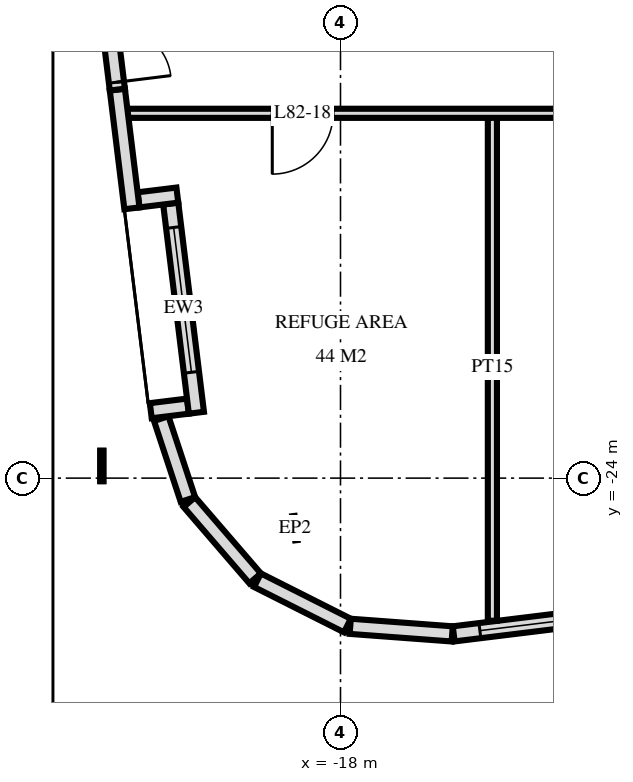
"""IFC4 building model, lengths in metres.
Left out: names, types, materials, properties, quantities, classifications, styles, units other than length and angle.
Written with IfcOpenShell. Run it as: python <this file> out.ifc"""

import sys

from ifc_helpers import new_model, si_unit, direction, frame, frame_2d, origin, place, context, subcontext, project, spatial, rectangle, extrude, element, fill, save


model = new_model("IFC4")
c1 = context("Model", 3, precision=1e-05, world=origin(), true_north=direction((0.0, 1.0)))
c2 = subcontext(c1, "Body", "Model", "MODEL_VIEW")
j1 = project(units=[si_unit("LENGTHUNIT", "METRE"), si_unit("PLANEANGLEUNIT", "RADIAN")], contexts=[c1])
p1 = place(None, origin())
s1 = spatial("IfcSite", under=j1, at=p1, CompositionType="ELEMENT")
p2 = place(p1, origin())
s2 = spatial("IfcBuilding", under=s1, at=p2, CompositionType="ELEMENT")
p3 = place(p2, frame((0.0, 0.0, 308.6)))
s3 = spatial("IfcBuildingStorey", under=s2, at=p3, CompositionType="ELEMENT", Elevation=308.6)
p4 = place(p3, frame((-21.321, -19.424, 0.0), z_axis=(0.0, 0.0, 1.0), x_axis=(0.992544261174, 0.121884739035, 0.0)))
e1 = element("IfcWall", 1, at=p4, inside=s3, PredefinedType="SOLIDWALL", context=c2, shape_type="SweptSolid", body=[
    extrude(rectangle(XDim=0.643, YDim=0.25, at=frame_2d((0.322, 0.0))), origin(), (0.0, 0.0, 1.0), 5.72),
])
p5 = place(p3, frame((-20.792, -19.485, 0.0), z_axis=(0.0, 0.0, 1.0), x_axis=(0.121849912676, -0.992548537242, 0.0)))
e2 = element("IfcWall", 2, at=p5, inside=s3, PredefinedType="SOLIDWALL", context=c2, shape_type="SweptSolid", body=[
    extrude(rectangle(XDim=3.466, YDim=0.25, at=frame_2d((1.733, 0.0))), origin(), (0.0, 0.0, 1.0), 5.72),
])
p6 = place(p5, frame((0.396, 0.0, 1.005)))
e3 = element("IfcOpeningElement", 3, at=p6, cuts=e2, PredefinedType="OPENING", context=c2, shape_type="SweptSolid", body=[
    extrude(rectangle(XDim=2.4, YDim=3.6, at=frame_2d((1.2, 1.8))), frame((0.0, 0.135, 0.0), z_axis=(0.0, -1.0, 0.0), x_axis=(1.0, 0.0, 0.0)), (0.0, 0.0, 1.0), 0.27),
])
p7 = place(p3, frame((-20.509, -22.816, 0.0), z_axis=(0.0, 0.0, 1.0), x_axis=(-0.992567834349, -0.121692621863, 0.0)))
e4 = element("IfcWall", 4, at=p7, inside=s3, PredefinedType="SOLIDWALL", context=c2, shape_type="SweptSolid", body=[
    extrude(rectangle(XDim=0.616, YDim=0.25, at=frame_2d((0.308, 0.0))), origin(), (0.0, 0.0, 1.0), 5.72),
])
p8 = place(p3, frame((-20.948, -23.021, 0.0), z_axis=(0.0, 0.0, 1.0), x_axis=(0.31308991213, -0.949723489718, 0.0)))
e5 = element("IfcWall", 5, at=p8, inside=s3, PredefinedType="SOLIDWALL", context=c2, shape_type="SweptSolid", body=[
    extrude(rectangle(XDim=1.401, YDim=0.25, at=frame_2d((0.701, 0.0))), origin(), (0.0, 0.0, 1.0), 5.72),
])
for number, where, z_axis, x_axis in (
    (6, (-20.485, -24.394, 0.0), (0.0, 0.0, 1.0), (0.653, -0.758, 0.0)),
    (7, (-19.366, -25.679, 0.0), (0.0, 0.0, 1.0), (0.893, -0.45, 0.0)),
):
    element("IfcWall", number, at=place(p3, frame(where, z_axis=z_axis, x_axis=x_axis)), inside=s3, PredefinedType="SOLIDWALL", context=c2, shape_type="SweptSolid", body=[
        extrude(rectangle(XDim=1.656, YDim=0.25, at=frame_2d((0.828, 0.0))), origin(), (0.0, 0.0, 1.0), 5.72),
    ])
p9 = place(p3, frame((-17.84, -26.438, 0.0), z_axis=(0.0, 0.0, 1.0), x_axis=(0.997254267475, -0.074053534713, 0.0)))
e8 = element("IfcWall", 8, at=p9, inside=s3, PredefinedType="SOLIDWALL", context=c2, shape_type="SweptSolid", body=[
    extrude(rectangle(XDim=1.681, YDim=0.25, at=frame_2d((0.841, 0.0))), origin(), (0.0, 0.0, 1.0), 5.72),
])
p10 = place(p3, frame((-16.138, -26.561, 0.0), z_axis=(0.0, 0.0, 1.0), x_axis=(0.992550651974, 0.12183268554, 0.0)))
e9 = element("IfcWall", 9, at=p10, inside=s3, PredefinedType="SOLIDWALL", context=c2, shape_type="SweptSolid", body=[
    extrude(rectangle(XDim=6.551, YDim=0.25, at=frame_2d((3.275, 0.0))), origin(), (0.0, 0.0, 1.0), 5.72),
])
p11 = place(p10, frame((0.434, 0.0, 1.205)))
e10 = element("IfcOpeningElement", 10, at=p11, cuts=e9, PredefinedType="OPENING", context=c2, shape_type="SweptSolid", body=[
    extrude(rectangle(XDim=2.4, YDim=3.31, at=frame_2d((1.2, 1.655))), frame((0.0, 0.135, 0.0), z_axis=(0.0, -1.0, 0.0), x_axis=(1.0, 0.0, 0.0)), (0.0, 0.0, 1.0), 0.27),
])
p12 = place(p10, frame((3.302, 0.0, 1.205)))
e11 = element("IfcOpeningElement", 11, at=p12, cuts=e9, PredefinedType="OPENING", context=c2, shape_type="SweptSolid", body=[
    extrude(rectangle(XDim=2.4, YDim=3.31, at=frame_2d((1.2, 1.655))), frame((0.0, 0.135, 0.0), z_axis=(0.0, -1.0, 0.0), x_axis=(1.0, 0.0, 0.0)), (0.0, 0.0, 1.0), 0.27),
])
p13 = place(p3, frame((-15.502, -26.345, 0.0), z_axis=(0.0, 0.0, 1.0), x_axis=(0.0, 1.0, 0.0)))
e12 = element("IfcWall", 12, at=p13, inside=s3, PredefinedType="PARTITIONING", context=c2, shape_type="SweptSolid", body=[
    extrude(rectangle(XDim=8.345, YDim=0.15, at=frame_2d((4.173, 0.0))), origin(), (0.0, 0.0, 1.0), 5.7),
])
p14 = place(p3, frame((-21.567, -18.0, 0.0), z_axis=(0.0, 0.0, 1.0), x_axis=(1.0, 0.0, 0.0)))
e13 = element("IfcWall", 13, at=p14, inside=s3, PredefinedType="PARTITIONING", context=c2, shape_type="SweptSolid", body=[
    extrude(rectangle(XDim=44.835, YDim=0.15, at=frame_2d((22.418, 0.0))), origin(), (0.0, 0.0, 1.0), 5.7),
])
p15 = place(p14, frame((2.445, 0.0, 0.0)))
e14 = element("IfcOpeningElement", 14, at=p15, cuts=e13, PredefinedType="OPENING", context=c2, shape_type="SweptSolid", body=[
    extrude(rectangle(XDim=1.0, YDim=2.1, at=frame_2d((0.5, 1.05))), frame((0.0, 0.085, 0.0), z_axis=(0.0, -1.0, 0.0), x_axis=(1.0, 0.0, 0.0)), (0.0, 0.0, 1.0), 0.17),
])
p16 = place(p14, frame((11.05, 0.0, 0.0)))
e15 = element("IfcOpeningElement", 15, at=p16, cuts=e13, PredefinedType="OPENING", context=c2, shape_type="SweptSolid", body=[
    extrude(rectangle(XDim=1.0, YDim=2.1, at=frame_2d((0.5, 1.05))), frame((0.0, 0.085, 0.0), z_axis=(0.0, -1.0, 0.0), x_axis=(1.0, 0.0, 0.0)), (0.0, 0.0, 1.0), 0.17),
])
p17 = place(p14, frame((19.545, 0.0, 0.0)))
e16 = element("IfcOpeningElement", 16, at=p17, cuts=e13, PredefinedType="OPENING", context=c2, shape_type="SweptSolid", body=[
    extrude(rectangle(XDim=1.0, YDim=2.1, at=frame_2d((0.5, 1.05))), frame((0.0, 0.085, 0.0), z_axis=(0.0, -1.0, 0.0), x_axis=(1.0, 0.0, 0.0)), (0.0, 0.0, 1.0), 0.17),
])
p18 = place(p14, frame((29.545, 0.0, 0.0)))
e17 = element("IfcOpeningElement", 17, at=p18, cuts=e13, PredefinedType="OPENING", context=c2, shape_type="SweptSolid", body=[
    extrude(rectangle(XDim=1.0, YDim=2.1, at=frame_2d((0.5, 1.05))), frame((0.0, 0.085, 0.0), z_axis=(0.0, -1.0, 0.0), x_axis=(1.0, 0.0, 0.0)), (0.0, 0.0, 1.0), 0.17),
])
p19 = place(p14, frame((38.946, 0.0, 0.0)))
e18 = element("IfcOpeningElement", 18, at=p19, cuts=e13, PredefinedType="OPENING", context=c2, shape_type="SweptSolid", body=[
    extrude(rectangle(XDim=1.0, YDim=2.1, at=frame_2d((0.5, 1.05))), frame((0.0, 0.085, 0.0), z_axis=(0.0, -1.0, 0.0), x_axis=(1.0, 0.0, 0.0)), (0.0, 0.0, 1.0), 0.17),
])
p20 = place(p3, frame((-21.97, -15.166, 0.0), z_axis=(0.0, 0.0, 1.0), x_axis=(0.121935848955, -0.992537983525, 0.0)))
e19 = element("IfcWall", 19, at=p20, inside=s3, PredefinedType="SOLIDWALL", context=c2, shape_type="SweptSolid", body=[
    extrude(rectangle(XDim=2.463, YDim=0.25, at=frame_2d((1.231, 0.0))), origin(), (0.0, 0.0, 1.0), 5.176),
])
p21 = place(p20, frame((0.541, 0.0, 0.0)))
e20 = element("IfcOpeningElement", 20, at=p21, cuts=e19, PredefinedType="OPENING", context=c2, shape_type="SweptSolid", body=[
    extrude(rectangle(XDim=1.8, YDim=2.4, at=frame_2d((0.9, 1.2))), frame((0.0, 0.135, 0.0), z_axis=(0.0, -1.0, 0.0), x_axis=(1.0, 0.0, 0.0)), (0.0, 0.0, 1.0), 0.27),
])
p22 = place(p3, frame((-21.67, -17.61, 0.0), z_axis=(0.0, 0.0, 1.0), x_axis=(0.121850554592, -0.992548458437, 0.0)))
e21 = element("IfcWall", 21, at=p22, inside=s3, PredefinedType="SOLIDWALL", context=c2, shape_type="SweptSolid", body=[
    extrude(rectangle(XDim=1.968, YDim=0.25, at=frame_2d((0.984, 0.0))), origin(), (0.0, 0.0, 1.0), 5.72),
])
p23 = place(p21, origin())
e22 = element("IfcDoor", 22, at=p23, inside=s3, OperationType="DOUBLE_DOOR_SINGLE_SWING", PredefinedType="DOOR", context=c2, shape_type="SweptSolid", body=[
    extrude(rectangle(XDim=1.8, YDim=2.4, at=frame_2d((0.9, 1.2))), frame((0.0, 0.025, 0.0), z_axis=(0.0, -1.0, 0.0), x_axis=(1.0, 0.0, 0.0)), (0.0, 0.0, 1.0), 0.05),
])
fill(e20, e22)
p24 = place(p6, origin())
e23 = element("IfcWindow", 23, at=p24, inside=s3, PartitioningType="SINGLE_PANEL", PredefinedType="USERDEFINED", context=c2, shape_type="SweptSolid", body=[
    extrude(rectangle(XDim=2.4, YDim=3.6, at=frame_2d((1.2, 1.8))), frame((0.0, 0.125, 0.0), z_axis=(0.0, -1.0, 0.0), x_axis=(1.0, 0.0, 0.0)), (0.0, 0.0, 1.0), 0.06),
])
fill(e3, e23)
p25 = place(p11, origin())
e24 = element("IfcWindow", 24, at=p25, inside=s3, PartitioningType="SINGLE_PANEL", PredefinedType="USERDEFINED", context=c2, shape_type="SweptSolid", body=[
    extrude(rectangle(XDim=2.4, YDim=3.31, at=frame_2d((1.2, 1.655))), frame((0.0, 0.03, 0.0), z_axis=(0.0, -1.0, 0.0), x_axis=(1.0, 0.0, 0.0)), (0.0, 0.0, 1.0), 0.06),
])
fill(e10, e24)
p26 = place(p15, frame((0.5, 0.0, 0.0), z_axis=(0.0, 0.0, 1.0), x_axis=(-1.0, 0.0, 0.0)))
e25 = element("IfcDoor", 25, at=p26, inside=s3, OperationType="SINGLE_SWING_LEFT", PredefinedType="DOOR", context=c2, shape_type="SweptSolid", body=[
    extrude(rectangle(XDim=1.0, YDim=2.1, at=frame_2d((0.0, 1.05))), frame((0.0, -0.025, 0.0), z_axis=(0.0, 1.0, 0.0), x_axis=(-1.0, 0.0, 0.0)), (0.0, 0.0, 1.0), 0.05),
])
fill(e14, e25)
save(model, sys.argv[1])
